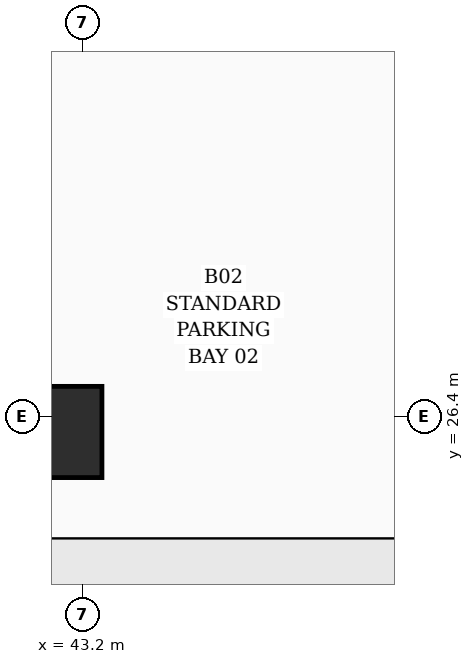
"""IFC4 building model, lengths in metres.
Left out: names, types, materials, properties, quantities, classifications, styles, units other than length and angle.
Written with IfcOpenShell. Run it as: python <this file> out.ifc"""

import sys

from ifc_helpers import new_model, si_unit, direction, frame, origin, origin_2d, place, context, subcontext, project, spatial, rectangle, extrude, element, save


model = new_model("IFC4")
c1 = context("Model", 3, precision=1e-05, world=origin(), true_north=direction((0.0, 1.0)))
c2 = subcontext(c1, "Body", "Model", "MODEL_VIEW")
j1 = project(units=[si_unit("LENGTHUNIT", "METRE"), si_unit("PLANEANGLEUNIT", "RADIAN")], contexts=[c1])
p1 = place(None, origin())
s1 = spatial("IfcSite", under=j1, at=p1, CompositionType="ELEMENT")
p2 = place(p1, origin())
s2 = spatial("IfcBuilding", under=s1, at=p2, CompositionType="ELEMENT")
p3 = place(p2, frame((0.0, 0.0, -9.0)))
s3 = spatial("IfcBuildingStorey", under=s2, at=p3, CompositionType="ELEMENT", Elevation=-9.0)
p4 = place(p3, frame((42.85, 26.2, 0.0), z_axis=(0.0, 0.0, 1.0), x_axis=(1.0, 0.0, 0.0)))
e1 = element("IfcColumn", 1, at=p4, inside=s3, PredefinedType="COLUMN", context=c2, shape_type="SweptSolid", body=[
    extrude(rectangle(XDim=1.2, YDim=1.2, at=origin_2d()), origin(), (0.0, 0.0, 1.0), 4.5),
])
save(model, sys.argv[1])
